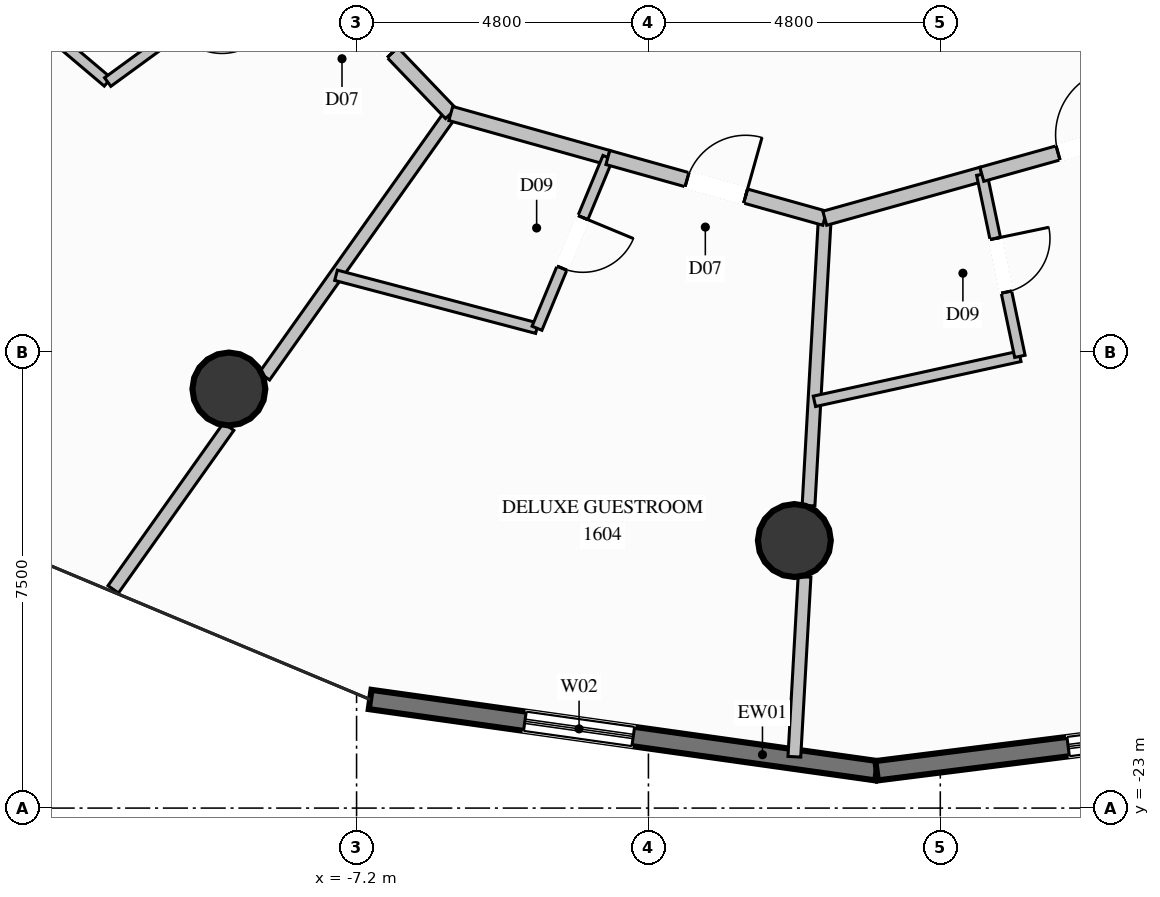
"""IFC4 building model, lengths in metres.
Left out: names, types, materials, properties, quantities, classifications, styles, units other than length and angle.
Written with IfcOpenShell. Run it as: python <this file> out.ifc"""

import sys

from ifc_helpers import new_model, si_unit, direction, frame, frame_2d, origin, origin_2d, place, context, subcontext, project, spatial, rectangle, circle, extrude, element, fill, save


model = new_model("IFC4")
c1 = context("Model", 3, precision=1e-05, world=origin(), true_north=direction((0.0, 1.0)))
c2 = subcontext(c1, "Body", "Model", "MODEL_VIEW")
j1 = project(units=[si_unit("LENGTHUNIT", "METRE"), si_unit("PLANEANGLEUNIT", "RADIAN")], contexts=[c1])
p1 = place(None, origin())
s1 = spatial("IfcSite", under=j1, at=p1, CompositionType="ELEMENT")
p2 = place(p1, origin())
s2 = spatial("IfcBuilding", under=s1, at=p2, CompositionType="ELEMENT")
p3 = place(p2, frame((0.0, 0.0, 60.8)))
s3 = spatial("IfcBuildingStorey", under=s2, at=p3, CompositionType="ELEMENT", Elevation=60.8)
for number, where, z_axis, x_axis in (
    (1, (-9.3, -16.108, 0.0), (0.0, 0.0, 1.0), (1.0, 0.0, 0.0)),
    (2, (0.0, -18.6, 0.0), (0.0, 0.0, 1.0), (1.0, 0.0, 0.0)),
):
    element("IfcColumn", number, at=place(p3, frame(where, z_axis=z_axis, x_axis=x_axis)), inside=s3, PredefinedType="COLUMN", context=c2, shape_type="SweptSolid", body=[
        extrude(circle(Radius=0.6, at=origin_2d()), origin(), (0.0, 0.0, 1.0), 3.6),
    ])
p4 = place(p3, frame((1.353, -22.386, 0.0), z_axis=(0.0, 0.0, 1.0), x_axis=(-0.990249073368, 0.139308193205, 0.0)))
e3 = element("IfcWall", 3, at=p4, inside=s3, PredefinedType="SOLIDWALL", context=c2, shape_type="SweptSolid", body=[
    extrude(rectangle(XDim=8.412, YDim=0.32, at=frame_2d((4.206, 0.0))), origin(), (0.0, 0.0, 1.0), 3.34),
])
p5 = place(p4, frame((4.042, 0.0, 0.35)))
e4 = element("IfcOpeningElement", 4, at=p5, cuts=e3, PredefinedType="OPENING", context=c2, shape_type="SweptSolid", body=[
    extrude(rectangle(XDim=1.8, YDim=2.6, at=frame_2d((0.9, 1.3))), frame((0.0, 0.17, 0.0), z_axis=(0.0, -1.0, 0.0), x_axis=(1.0, 0.0, 0.0)), (0.0, 0.0, 1.0), 0.34),
])
p6 = place(p3, frame((9.439, -21.366, 0.0), z_axis=(0.0, 0.0, 1.0), x_axis=(-0.992137142599, -0.125155464426, 0.0)))
e5 = element("IfcWall", 5, at=p6, inside=s3, PredefinedType="SOLIDWALL", context=c2, shape_type="SweptSolid", body=[
    extrude(rectangle(XDim=8.15, YDim=0.32, at=frame_2d((4.075, 0.0))), origin(), (0.0, 0.0, 1.0), 3.34),
])
p7 = place(p6, frame((3.175, 0.0, 0.35)))
e6 = element("IfcOpeningElement", 6, at=p7, cuts=e5, PredefinedType="OPENING", context=c2, shape_type="SweptSolid", body=[
    extrude(rectangle(XDim=1.8, YDim=2.6, at=frame_2d((0.9, 1.3))), frame((0.0, 0.17, 0.0), z_axis=(0.0, -1.0, 0.0), x_axis=(1.0, 0.0, 0.0)), (0.0, 0.0, 1.0), 0.34),
])
p8 = place(p3, frame((-5.65, -11.578, 0.0), z_axis=(0.0, 0.0, 1.0), x_axis=(-0.578698566801, -0.815541518736, 0.0)))
e7 = element("IfcWall", 7, at=p8, inside=s3, PredefinedType="PARTITIONING", context=c2, shape_type="SweptSolid", body=[
    extrude(rectangle(XDim=5.298, YDim=0.21, at=frame_2d((2.649, 0.0))), origin(), (0.0, 0.0, 1.0), 2.709),
])
p9 = place(p3, frame((-9.304, -16.728, 0.0), z_axis=(0.0, 0.0, 1.0), x_axis=(-0.578651190497, -0.815575134329, 0.0)))
e8 = element("IfcWall", 8, at=p9, inside=s3, PredefinedType="PARTITIONING", context=c2, shape_type="SweptSolid", body=[
    extrude(rectangle(XDim=3.28, YDim=0.21, at=frame_2d((1.64, 0.0))), origin(), (0.0, 0.0, 1.0), 3.34),
])
p10 = place(p3, frame((0.5, -13.3, 0.0), z_axis=(0.0, 0.0, 1.0), x_axis=(-0.056426975332, -0.998406728971, 0.0)))
e9 = element("IfcWall", 9, at=p10, inside=s3, PredefinedType="PARTITIONING", context=c2, shape_type="SweptSolid", body=[
    extrude(rectangle(XDim=4.733, YDim=0.21, at=frame_2d((2.367, 0.0))), origin(), (0.0, 0.0, 1.0), 3.34),
])
p11 = place(p3, frame((0.167, -19.197, 0.0), z_axis=(0.0, 0.0, 1.0), x_axis=(-0.056345984429, -0.99841130304, 0.0)))
e10 = element("IfcWall", 10, at=p11, inside=s3, PredefinedType="PARTITIONING", context=c2, shape_type="SweptSolid", body=[
    extrude(rectangle(XDim=2.964, YDim=0.21, at=frame_2d((1.482, 0.0))), origin(), (0.0, 0.0, 1.0), 3.34),
])
p12 = place(p3, frame((-14.012, -8.759, 0.0), z_axis=(0.0, 0.0, 1.0), x_axis=(0.763339486507, -0.645997545149, 0.0)))
e11 = element("IfcWall", 11, at=p12, inside=s3, PredefinedType="PLUMBINGWALL", context=c2, shape_type="SweptSolid", body=[
    extrude(rectangle(XDim=3.562, YDim=0.175, at=frame_2d((1.781, 0.0))), origin(), (0.0, 0.0, 1.0), 3.34),
])
p13 = place(p3, frame((-8.261, -8.85, 0.0), z_axis=(0.0, 0.0, 1.0), x_axis=(-0.808116582647, -0.589022570748, 0.0)))
e12 = element("IfcWall", 12, at=p13, inside=s3, PredefinedType="PLUMBINGWALL", context=c2, shape_type="SweptSolid", body=[
    extrude(rectangle(XDim=3.752, YDim=0.175, at=frame_2d((1.876, 0.0))), origin(), (0.0, 0.0, 1.0), 3.34),
])
p14 = place(p13, frame((1.426, 0.0, 0.0)))
e13 = element("IfcOpeningElement", 13, at=p14, cuts=e12, PredefinedType="OPENING", context=c2, shape_type="SweptSolid", body=[
    extrude(rectangle(XDim=0.9, YDim=2.1, at=frame_2d((0.45, 1.05))), frame((0.0, 0.098, 0.0), z_axis=(0.0, -1.0, 0.0), x_axis=(1.0, 0.0, 0.0)), (0.0, 0.0, 1.0), 0.195),
])
p15 = place(p3, frame((-8.261, -8.85, 0.0), z_axis=(0.0, 0.0, 1.0), x_axis=(0.691485368968, -0.722390465402, 0.0)))
e14 = element("IfcWall", 14, at=p15, inside=s3, PredefinedType="PARTITIONING", context=c2, shape_type="SweptSolid", body=[
    extrude(rectangle(XDim=3.776, YDim=0.24, at=frame_2d((1.888, 0.0))), origin(), (0.0, 0.0, 1.0), 3.34),
])
p16 = place(p15, frame((1.388, 0.0, 0.0)))
e15 = element("IfcOpeningElement", 15, at=p16, cuts=e14, PredefinedType="OPENING", context=c2, shape_type="SweptSolid", body=[
    extrude(rectangle(XDim=1.0, YDim=2.2, at=frame_2d((0.5, 1.1))), frame((0.0, 0.13, 0.0), z_axis=(0.0, -1.0, 0.0), x_axis=(1.0, 0.0, 0.0)), (0.0, 0.0, 1.0), 0.26),
])
p17 = place(p3, frame((-5.65, -11.578, 0.0), z_axis=(0.0, 0.0, 1.0), x_axis=(0.96297347206, -0.269596164862, 0.0)))
e16 = element("IfcWall", 16, at=p17, inside=s3, PredefinedType="PARTITIONING", context=c2, shape_type="SweptSolid", body=[
    extrude(rectangle(XDim=2.682, YDim=0.24, at=frame_2d((1.341, 0.0))), origin(), (0.0, 0.0, 1.0), 3.34),
])
p18 = place(p3, frame((-7.538, -14.238, 0.0), z_axis=(0.0, 0.0, 1.0), x_axis=(0.96699769845, -0.254785107872, 0.0)))
e17 = element("IfcWall", 17, at=p18, inside=s3, PredefinedType="PLUMBINGWALL", context=c2, shape_type="SweptSolid", body=[
    extrude(rectangle(XDim=3.418, YDim=0.175, at=frame_2d((1.709, 0.0))), origin(), (0.0, 0.0, 1.0), 3.34),
])
p19 = place(p3, frame((-3.067, -12.301, 0.0), z_axis=(0.0, 0.0, 1.0), x_axis=(-0.383514663352, -0.923534787105, 0.0)))
e18 = element("IfcWall", 18, at=p19, inside=s3, PredefinedType="PLUMBINGWALL", context=c2, shape_type="SweptSolid", body=[
    extrude(rectangle(XDim=3.04, YDim=0.175, at=frame_2d((1.52, 0.0))), origin(), (0.0, 0.0, 1.0), 3.34),
])
p20 = place(p19, frame((1.07, 0.0, 0.0)))
e19 = element("IfcOpeningElement", 19, at=p20, cuts=e18, PredefinedType="OPENING", context=c2, shape_type="SweptSolid", body=[
    extrude(rectangle(XDim=0.9, YDim=2.1, at=frame_2d((0.45, 1.05))), frame((0.0, 0.098, 0.0), z_axis=(0.0, -1.0, 0.0), x_axis=(1.0, 0.0, 0.0)), (0.0, 0.0, 1.0), 0.195),
])
p21 = place(p3, frame((-3.067, -12.301, 0.0), z_axis=(0.0, 0.0, 1.0), x_axis=(0.962943481199, -0.269703266603, 0.0)))
e20 = element("IfcWall", 20, at=p21, inside=s3, PredefinedType="PARTITIONING", context=c2, shape_type="SweptSolid", body=[
    extrude(rectangle(XDim=3.704, YDim=0.24, at=frame_2d((1.852, 0.0))), origin(), (0.0, 0.0, 1.0), 3.34),
])
p22 = place(p21, frame((1.352, 0.0, 0.0)))
e21 = element("IfcOpeningElement", 21, at=p22, cuts=e20, PredefinedType="OPENING", context=c2, shape_type="SweptSolid", body=[
    extrude(rectangle(XDim=1.0, YDim=2.2, at=frame_2d((0.5, 1.1))), frame((0.0, 0.13, 0.0), z_axis=(0.0, -1.0, 0.0), x_axis=(1.0, 0.0, 0.0)), (0.0, 0.0, 1.0), 0.26),
])
p23 = place(p3, frame((0.5, -13.3, 0.0), z_axis=(0.0, 0.0, 1.0), x_axis=(0.96297347206, 0.269596164862, 0.0)))
e22 = element("IfcWall", 22, at=p23, inside=s3, PredefinedType="PARTITIONING", context=c2, shape_type="SweptSolid", body=[
    extrude(rectangle(XDim=2.682, YDim=0.24, at=frame_2d((1.341, 0.0))), origin(), (0.0, 0.0, 1.0), 3.34),
])
p24 = place(p3, frame((0.33, -16.311, 0.0), z_axis=(0.0, 0.0, 1.0), x_axis=(0.976848417726, 0.213932626743, 0.0)))
e23 = element("IfcWall", 23, at=p24, inside=s3, PredefinedType="PLUMBINGWALL", context=c2, shape_type="SweptSolid", body=[
    extrude(rectangle(XDim=3.459, YDim=0.175, at=frame_2d((1.729, 0.0))), origin(), (0.0, 0.0, 1.0), 3.34),
])
p25 = place(p3, frame((3.083, -12.577, 0.0), z_axis=(0.0, 0.0, 1.0), x_axis=(0.204642647724, -0.97883675183, 0.0)))
e24 = element("IfcWall", 24, at=p25, inside=s3, PredefinedType="PLUMBINGWALL", context=c2, shape_type="SweptSolid", body=[
    extrude(rectangle(XDim=3.059, YDim=0.175, at=frame_2d((1.529, 0.0))), origin(), (0.0, 0.0, 1.0), 3.34),
])
p26 = place(p25, frame((1.079, 0.0, 0.0)))
e25 = element("IfcOpeningElement", 25, at=p26, cuts=e24, PredefinedType="OPENING", context=c2, shape_type="SweptSolid", body=[
    extrude(rectangle(XDim=0.9, YDim=2.1, at=frame_2d((0.45, 1.05))), frame((0.0, 0.098, 0.0), z_axis=(0.0, -1.0, 0.0), x_axis=(1.0, 0.0, 0.0)), (0.0, 0.0, 1.0), 0.195),
])
p27 = place(p3, frame((3.083, -12.577, 0.0), z_axis=(0.0, 0.0, 1.0), x_axis=(0.962943481199, 0.269703266603, 0.0)))
e26 = element("IfcWall", 26, at=p27, inside=s3, PredefinedType="PARTITIONING", context=c2, shape_type="SweptSolid", body=[
    extrude(rectangle(XDim=3.704, YDim=0.24, at=frame_2d((1.852, 0.0))), origin(), (0.0, 0.0, 1.0), 3.34),
])
p28 = place(p27, frame((1.302, 0.0, 0.0)))
e27 = element("IfcOpeningElement", 27, at=p28, cuts=e26, PredefinedType="OPENING", context=c2, shape_type="SweptSolid", body=[
    extrude(rectangle(XDim=1.1, YDim=2.3, at=frame_2d((0.55, 1.15))), frame((0.0, 0.13, 0.0), z_axis=(0.0, -1.0, 0.0), x_axis=(1.0, 0.0, 0.0)), (0.0, 0.0, 1.0), 0.26),
])
p29 = place(p5, origin())
e28 = element("IfcWindow", 28, at=p29, inside=s3, PartitioningType="SINGLE_PANEL", PredefinedType="WINDOW", context=c2, shape_type="SweptSolid", body=[
    extrude(rectangle(XDim=1.8, YDim=2.6, at=frame_2d((0.9, 1.3))), frame((0.0, 0.03, 0.0), z_axis=(0.0, -1.0, 0.0), x_axis=(1.0, 0.0, 0.0)), (0.0, 0.0, 1.0), 0.06),
])
fill(e4, e28)
p30 = place(p7, origin())
e29 = element("IfcWindow", 29, at=p30, inside=s3, PartitioningType="SINGLE_PANEL", PredefinedType="WINDOW", context=c2, shape_type="SweptSolid", body=[
    extrude(rectangle(XDim=1.8, YDim=2.6, at=frame_2d((0.9, 1.3))), frame((0.0, 0.03, 0.0), z_axis=(0.0, -1.0, 0.0), x_axis=(1.0, 0.0, 0.0)), (0.0, 0.0, 1.0), 0.06),
])
fill(e6, e29)
p31 = place(p16, origin())
e30 = element("IfcDoor", 30, at=p31, inside=s3, OperationType="SINGLE_SWING_RIGHT", PredefinedType="DOOR", context=c2, shape_type="SweptSolid", body=[
    extrude(rectangle(XDim=1.0, YDim=2.2, at=frame_2d((0.5, 1.1))), frame((0.0, 0.025, 0.0), z_axis=(0.0, -1.0, 0.0), x_axis=(1.0, 0.0, 0.0)), (0.0, 0.0, 1.0), 0.05),
])
fill(e15, e30)
p32 = place(p20, origin())
e31 = element("IfcDoor", 31, at=p32, inside=s3, OperationType="SINGLE_SWING_LEFT", PredefinedType="DOOR", context=c2, shape_type="SweptSolid", body=[
    extrude(rectangle(XDim=0.9, YDim=2.1, at=frame_2d((0.45, 1.05))), frame((0.0, 0.025, 0.0), z_axis=(0.0, -1.0, 0.0), x_axis=(1.0, 0.0, 0.0)), (0.0, 0.0, 1.0), 0.05),
])
fill(e19, e31)
p33 = place(p22, origin())
e32 = element("IfcDoor", 32, at=p33, inside=s3, OperationType="SINGLE_SWING_RIGHT", PredefinedType="DOOR", context=c2, shape_type="SweptSolid", body=[
    extrude(rectangle(XDim=1.0, YDim=2.2, at=frame_2d((0.5, 1.1))), frame((0.0, 0.025, 0.0), z_axis=(0.0, -1.0, 0.0), x_axis=(1.0, 0.0, 0.0)), (0.0, 0.0, 1.0), 0.05),
])
fill(e21, e32)
p34 = place(p26, origin())
e33 = element("IfcDoor", 33, at=p34, inside=s3, OperationType="SINGLE_SWING_LEFT", PredefinedType="DOOR", context=c2, shape_type="SweptSolid", body=[
    extrude(rectangle(XDim=0.9, YDim=2.1, at=frame_2d((0.45, 1.05))), frame((0.0, 0.025, 0.0), z_axis=(0.0, -1.0, 0.0), x_axis=(1.0, 0.0, 0.0)), (0.0, 0.0, 1.0), 0.05),
])
fill(e25, e33)
p35 = place(p28, origin())
e34 = element("IfcDoor", 34, at=p35, inside=s3, OperationType="SINGLE_SWING_RIGHT", PredefinedType="DOOR", context=c2, shape_type="SweptSolid", body=[
    extrude(rectangle(XDim=1.1, YDim=2.3, at=frame_2d((0.55, 1.15))), frame((0.0, 0.025, 0.0), z_axis=(0.0, -1.0, 0.0), x_axis=(1.0, 0.0, 0.0)), (0.0, 0.0, 1.0), 0.05),
])
fill(e27, e34)
save(model, sys.argv[1])
